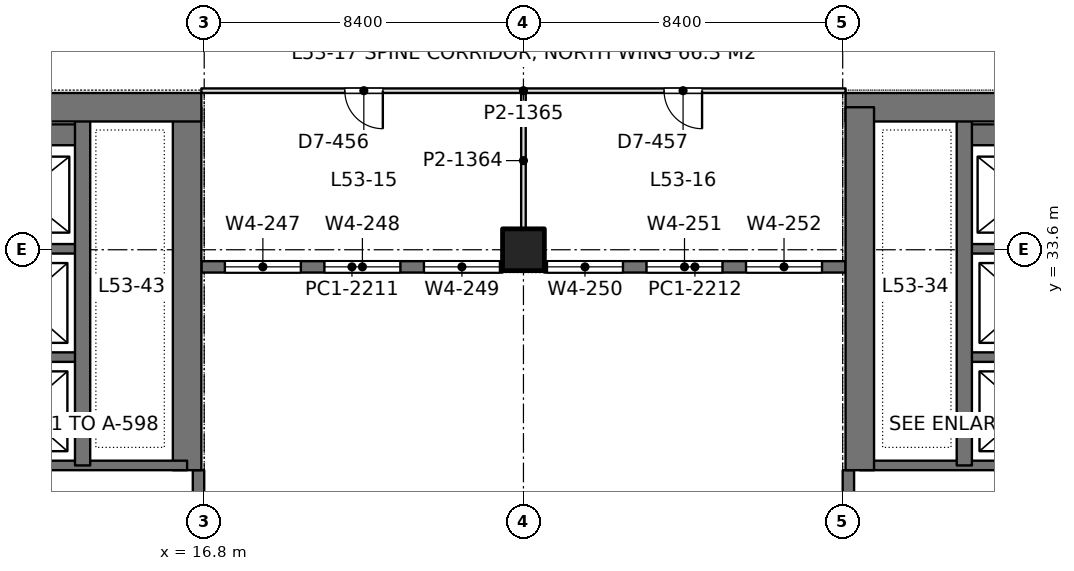
"""IFC4 building model, lengths in metres.
Left out: names, types, materials, properties, quantities, classifications, styles, units other than length and angle.
Written with IfcOpenShell. Run it as: python <this file> out.ifc"""

import sys

from ifc_helpers import new_model, si_unit, direction, frame, frame_2d, origin, origin_2d, place, context, subcontext, project, spatial, rectangle, extrude, element, fill, save


model = new_model("IFC4")
c1 = context("Model", 3, precision=1e-05, world=origin(), true_north=direction((0.0, 1.0)))
c2 = subcontext(c1, "Body", "Model", "MODEL_VIEW")
j1 = project(units=[si_unit("LENGTHUNIT", "METRE"), si_unit("PLANEANGLEUNIT", "RADIAN")], contexts=[c1])
p1 = place(None, origin())
s1 = spatial("IfcSite", under=j1, at=p1, CompositionType="ELEMENT")
p2 = place(p1, origin())
s2 = spatial("IfcBuilding", under=s1, at=p2, CompositionType="ELEMENT")
p3 = place(p2, frame((0.0, 0.0, 232.2)))
s3 = spatial("IfcBuildingStorey", under=s2, at=p3, CompositionType="ELEMENT", Elevation=232.2)
p4 = place(p3, frame((25.2, 33.6, 0.0), z_axis=(0.0, 0.0, 1.0), x_axis=(1.0, 0.0, 0.0)))
e1 = element("IfcColumn", 1, at=p4, inside=s3, PredefinedType="COLUMN", context=c2, shape_type="SweptSolid", body=[
    extrude(rectangle(XDim=1.1, YDim=1.1, at=origin_2d()), origin(), (0.0, 0.0, 1.0), 4.2),
])
p5 = place(p3, frame((-1.125, 37.35, 0.0), z_axis=(0.0, 0.0, 1.0), x_axis=(1.0, 0.0, 0.0)))
e2 = element("IfcWall", 2, at=p5, inside=s3, PredefinedType="SHEAR", context=c2, shape_type="SweptSolid", body=[
    extrude(rectangle(XDim=17.85, YDim=0.75, at=frame_2d((8.925, 0.0))), origin(), (0.0, 0.0, 1.0), 4.2),
])
p6 = place(p5, frame((8.875, 0.0, 0.0)))
e3 = element("IfcOpeningElement", 3, at=p6, cuts=e2, PredefinedType="OPENING", context=c2, shape_type="SweptSolid", body=[
    extrude(rectangle(XDim=1.8, YDim=2.4, at=frame_2d((0.9, 1.2))), frame((0.0, 0.385, 0.0), z_axis=(0.0, -1.0, 0.0), x_axis=(1.0, 0.0, 0.0)), (0.0, 0.0, 1.0), 0.77),
])
p7 = place(p3, frame((16.35, 27.8, 0.0), z_axis=(0.0, 0.0, 1.0), x_axis=(0.0, 1.0, 0.0)))
e4 = element("IfcWall", 4, at=p7, inside=s3, PredefinedType="SHEAR", context=c2, shape_type="SweptSolid", body=[
    extrude(rectangle(XDim=9.55, YDim=0.75, at=frame_2d((4.775, 0.0))), origin(), (0.0, 0.0, 1.0), 4.2),
])
p8 = place(p3, frame((13.6, 27.925, 0.0), z_axis=(0.0, 0.0, 1.0), x_axis=(0.0, 1.0, 0.0)))
e5 = element("IfcWall", 5, at=p8, inside=s3, PredefinedType="SHEAR", context=c2, shape_type="SweptSolid", body=[
    extrude(rectangle(XDim=9.425, YDim=0.4, at=frame_2d((4.712, 0.0))), origin(), (0.0, 0.0, 1.0), 4.2),
])
p9 = place(p3, frame((10.4, 27.925, 0.0), z_axis=(0.0, 0.0, 1.0), x_axis=(1.0, 0.0, 0.0)))
e6 = element("IfcWall", 6, at=p9, inside=s3, PredefinedType="SHEAR", context=c2, shape_type="SweptSolid", body=[
    extrude(rectangle(XDim=5.95, YDim=0.25, at=frame_2d((2.975, 0.0))), origin(), (0.0, 0.0, 1.0), 4.2),
])
for number, where, z_axis, x_axis in (
    (7, (10.4, 30.775, 0.0), (0.0, 0.0, 1.0), (1.0, 0.0, 0.0)),
    (8, (10.4, 33.625, 0.0), (0.0, 0.0, 1.0), (1.0, 0.0, 0.0)),
):
    element("IfcWall", number, at=place(p3, frame(where, z_axis=z_axis, x_axis=x_axis)), inside=s3, PredefinedType="SHEAR", context=c2, shape_type="SweptSolid", body=[
        extrude(rectangle(XDim=3.2, YDim=0.25, at=frame_2d((1.6, 0.0))), origin(), (0.0, 0.0, 1.0), 4.2),
    ])
p10 = place(p3, frame((10.4, 36.625, 0.0), z_axis=(0.0, 0.0, 1.0), x_axis=(1.0, 0.0, 0.0)))
e9 = element("IfcWall", 9, at=p10, inside=s3, PredefinedType="SHEAR", context=c2, shape_type="SweptSolid", body=[
    extrude(rectangle(XDim=3.2, YDim=0.55, at=frame_2d((1.6, 0.0))), origin(), (0.0, 0.0, 1.0), 4.2),
])
p11 = place(p3, frame((33.675, 37.35, 0.0), z_axis=(0.0, 0.0, 1.0), x_axis=(1.0, 0.0, 0.0)))
e10 = element("IfcWall", 10, at=p11, inside=s3, PredefinedType="SHEAR", context=c2, shape_type="SweptSolid", body=[
    extrude(rectangle(XDim=17.85, YDim=0.75, at=frame_2d((8.925, 0.0))), origin(), (0.0, 0.0, 1.0), 4.2),
])
p12 = place(p11, frame((7.175, 0.0, 0.0)))
e11 = element("IfcOpeningElement", 11, at=p12, cuts=e10, PredefinedType="OPENING", context=c2, shape_type="SweptSolid", body=[
    extrude(rectangle(XDim=1.8, YDim=2.4, at=frame_2d((0.9, 1.2))), frame((0.0, 0.385, 0.0), z_axis=(0.0, -1.0, 0.0), x_axis=(1.0, 0.0, 0.0)), (0.0, 0.0, 1.0), 0.77),
])
p13 = place(p3, frame((34.05, 27.8, 0.0), z_axis=(0.0, 0.0, 1.0), x_axis=(0.0, 1.0, 0.0)))
e12 = element("IfcWall", 12, at=p13, inside=s3, PredefinedType="SHEAR", context=c2, shape_type="SweptSolid", body=[
    extrude(rectangle(XDim=9.55, YDim=0.75, at=frame_2d((4.775, 0.0))), origin(), (0.0, 0.0, 1.0), 4.2),
])
p14 = place(p3, frame((36.8, 27.925, 0.0), z_axis=(0.0, 0.0, 1.0), x_axis=(0.0, 1.0, 0.0)))
e13 = element("IfcWall", 13, at=p14, inside=s3, PredefinedType="SHEAR", context=c2, shape_type="SweptSolid", body=[
    extrude(rectangle(XDim=9.425, YDim=0.4, at=frame_2d((4.712, 0.0))), origin(), (0.0, 0.0, 1.0), 4.2),
])
p15 = place(p3, frame((40.0, 27.925, 0.0), z_axis=(0.0, 0.0, 1.0), x_axis=(-1.0, 0.0, 0.0)))
e14 = element("IfcWall", 14, at=p15, inside=s3, PredefinedType="SHEAR", context=c2, shape_type="SweptSolid", body=[
    extrude(rectangle(XDim=5.95, YDim=0.25, at=frame_2d((2.975, 0.0))), origin(), (0.0, 0.0, 1.0), 4.2),
])
for number, where, z_axis, x_axis in (
    (15, (40.0, 30.775, 0.0), (0.0, 0.0, 1.0), (-1.0, 0.0, 0.0)),
    (16, (40.0, 33.625, 0.0), (0.0, 0.0, 1.0), (-1.0, 0.0, 0.0)),
):
    element("IfcWall", number, at=place(p3, frame(where, z_axis=z_axis, x_axis=x_axis)), inside=s3, PredefinedType="SHEAR", context=c2, shape_type="SweptSolid", body=[
        extrude(rectangle(XDim=3.2, YDim=0.25, at=frame_2d((1.6, 0.0))), origin(), (0.0, 0.0, 1.0), 4.2),
    ])
p16 = place(p3, frame((40.0, 36.625, 0.0), z_axis=(0.0, 0.0, 1.0), x_axis=(-1.0, 0.0, 0.0)))
e17 = element("IfcWall", 17, at=p16, inside=s3, PredefinedType="SHEAR", context=c2, shape_type="SweptSolid", body=[
    extrude(rectangle(XDim=3.2, YDim=0.55, at=frame_2d((1.6, 0.0))), origin(), (0.0, 0.0, 1.0), 4.2),
])
p17 = place(p3, frame((16.65, 17.1, 0.0), z_axis=(0.0, 0.0, 1.0), x_axis=(0.0, 1.0, 0.0)))
e18 = element("IfcWall", 18, at=p17, inside=s3, PredefinedType="SOLIDWALL", context=c2, shape_type="SweptSolid", body=[
    extrude(rectangle(XDim=10.7, YDim=0.3, at=frame_2d((5.35, 0.0))), origin(), (0.0, 0.0, 1.0), 4.05),
])
p18 = place(p17, frame((0.55, 0.0, 0.9)))
e19 = element("IfcOpeningElement", 19, at=p18, cuts=e18, PredefinedType="OPENING", context=c2, shape_type="SweptSolid", body=[
    extrude(rectangle(XDim=2.0, YDim=1.9, at=frame_2d((1.0, 0.95))), frame((0.0, 0.16, 0.0), z_axis=(0.0, -1.0, 0.0), x_axis=(1.0, 0.0, 0.0)), (0.0, 0.0, 1.0), 0.32),
])
p19 = place(p17, frame((2.9, 0.0, 0.9)))
e20 = element("IfcOpeningElement", 20, at=p19, cuts=e18, PredefinedType="OPENING", context=c2, shape_type="SweptSolid", body=[
    extrude(rectangle(XDim=2.0, YDim=1.9, at=frame_2d((1.0, 0.95))), frame((0.0, 0.16, 0.0), z_axis=(0.0, -1.0, 0.0), x_axis=(1.0, 0.0, 0.0)), (0.0, 0.0, 1.0), 0.32),
])
p20 = place(p17, frame((7.675, 0.0, 0.9)))
e21 = element("IfcOpeningElement", 21, at=p20, cuts=e18, PredefinedType="OPENING", context=c2, shape_type="SweptSolid", body=[
    extrude(rectangle(XDim=2.0, YDim=1.9, at=frame_2d((1.0, 0.95))), frame((0.0, 0.16, 0.0), z_axis=(0.0, -1.0, 0.0), x_axis=(1.0, 0.0, 0.0)), (0.0, 0.0, 1.0), 0.32),
])
p21 = place(p3, frame((33.75, 17.1, 0.0), z_axis=(0.0, 0.0, 1.0), x_axis=(0.0, 1.0, 0.0)))
e22 = element("IfcWall", 22, at=p21, inside=s3, PredefinedType="SOLIDWALL", context=c2, shape_type="SweptSolid", body=[
    extrude(rectangle(XDim=10.7, YDim=0.3, at=frame_2d((5.35, 0.0))), origin(), (0.0, 0.0, 1.0), 4.05),
])
p22 = place(p21, frame((0.55, 0.0, 0.9)))
e23 = element("IfcOpeningElement", 23, at=p22, cuts=e22, PredefinedType="OPENING", context=c2, shape_type="SweptSolid", body=[
    extrude(rectangle(XDim=2.0, YDim=1.9, at=frame_2d((1.0, 0.95))), frame((0.0, 0.16, 0.0), z_axis=(0.0, -1.0, 0.0), x_axis=(1.0, 0.0, 0.0)), (0.0, 0.0, 1.0), 0.32),
])
p23 = place(p21, frame((2.9, 0.0, 0.9)))
e24 = element("IfcOpeningElement", 24, at=p23, cuts=e22, PredefinedType="OPENING", context=c2, shape_type="SweptSolid", body=[
    extrude(rectangle(XDim=2.0, YDim=1.9, at=frame_2d((1.0, 0.95))), frame((0.0, 0.16, 0.0), z_axis=(0.0, -1.0, 0.0), x_axis=(1.0, 0.0, 0.0)), (0.0, 0.0, 1.0), 0.32),
])
p24 = place(p21, frame((7.675, 0.0, 0.9)))
e25 = element("IfcOpeningElement", 25, at=p24, cuts=e22, PredefinedType="OPENING", context=c2, shape_type="SweptSolid", body=[
    extrude(rectangle(XDim=2.0, YDim=1.9, at=frame_2d((1.0, 0.95))), frame((0.0, 0.16, 0.0), z_axis=(0.0, -1.0, 0.0), x_axis=(1.0, 0.0, 0.0)), (0.0, 0.0, 1.0), 0.32),
])
p25 = place(p3, frame((16.725, 33.15, 0.0), z_axis=(0.0, 0.0, 1.0), x_axis=(1.0, 0.0, 0.0)))
e26 = element("IfcWall", 26, at=p25, inside=s3, PredefinedType="SOLIDWALL", context=c2, shape_type="SweptSolid", body=[
    extrude(rectangle(XDim=7.925, YDim=0.3, at=frame_2d((3.962, 0.0))), origin(), (0.0, 0.0, 1.0), 4.05),
])
p26 = place(p25, frame((0.619, 0.0, 0.9)))
e27 = element("IfcOpeningElement", 27, at=p26, cuts=e26, PredefinedType="OPENING", context=c2, shape_type="SweptSolid", body=[
    extrude(rectangle(XDim=2.0, YDim=1.9, at=frame_2d((1.0, 0.95))), frame((0.0, 0.16, 0.0), z_axis=(0.0, -1.0, 0.0), x_axis=(1.0, 0.0, 0.0)), (0.0, 0.0, 1.0), 0.32),
])
p27 = place(p25, frame((3.238, 0.0, 0.9)))
e28 = element("IfcOpeningElement", 28, at=p27, cuts=e26, PredefinedType="OPENING", context=c2, shape_type="SweptSolid", body=[
    extrude(rectangle(XDim=2.0, YDim=1.9, at=frame_2d((1.0, 0.95))), frame((0.0, 0.16, 0.0), z_axis=(0.0, -1.0, 0.0), x_axis=(1.0, 0.0, 0.0)), (0.0, 0.0, 1.0), 0.32),
])
p28 = place(p25, frame((5.856, 0.0, 0.9)))
e29 = element("IfcOpeningElement", 29, at=p28, cuts=e26, PredefinedType="OPENING", context=c2, shape_type="SweptSolid", body=[
    extrude(rectangle(XDim=2.0, YDim=1.9, at=frame_2d((1.0, 0.95))), frame((0.0, 0.16, 0.0), z_axis=(0.0, -1.0, 0.0), x_axis=(1.0, 0.0, 0.0)), (0.0, 0.0, 1.0), 0.32),
])
p29 = place(p3, frame((25.75, 33.15, 0.0), z_axis=(0.0, 0.0, 1.0), x_axis=(1.0, 0.0, 0.0)))
e30 = element("IfcWall", 30, at=p29, inside=s3, PredefinedType="SOLIDWALL", context=c2, shape_type="SweptSolid", body=[
    extrude(rectangle(XDim=7.925, YDim=0.3, at=frame_2d((3.962, 0.0))), origin(), (0.0, 0.0, 1.0), 4.05),
])
p30 = place(p29, frame((0.069, 0.0, 0.9)))
e31 = element("IfcOpeningElement", 31, at=p30, cuts=e30, PredefinedType="OPENING", context=c2, shape_type="SweptSolid", body=[
    extrude(rectangle(XDim=2.0, YDim=1.9, at=frame_2d((1.0, 0.95))), frame((0.0, 0.16, 0.0), z_axis=(0.0, -1.0, 0.0), x_axis=(1.0, 0.0, 0.0)), (0.0, 0.0, 1.0), 0.32),
])
p31 = place(p29, frame((2.688, 0.0, 0.9)))
e32 = element("IfcOpeningElement", 32, at=p31, cuts=e30, PredefinedType="OPENING", context=c2, shape_type="SweptSolid", body=[
    extrude(rectangle(XDim=2.0, YDim=1.9, at=frame_2d((1.0, 0.95))), frame((0.0, 0.16, 0.0), z_axis=(0.0, -1.0, 0.0), x_axis=(1.0, 0.0, 0.0)), (0.0, 0.0, 1.0), 0.32),
])
p32 = place(p29, frame((5.306, 0.0, 0.9)))
e33 = element("IfcOpeningElement", 33, at=p32, cuts=e30, PredefinedType="OPENING", context=c2, shape_type="SweptSolid", body=[
    extrude(rectangle(XDim=2.0, YDim=1.9, at=frame_2d((1.0, 0.95))), frame((0.0, 0.16, 0.0), z_axis=(0.0, -1.0, 0.0), x_axis=(1.0, 0.0, 0.0)), (0.0, 0.0, 1.0), 0.32),
])
p33 = place(p3, frame((25.2, 34.149, 0.0), z_axis=(0.0, 0.0, 1.0), x_axis=(0.0, 1.0, 0.0)))
e34 = element("IfcWall", 34, at=p33, inside=s3, PredefinedType="PARTITIONING", context=c2, shape_type="SweptSolid", body=[
    extrude(rectangle(XDim=3.593, YDim=0.12, at=frame_2d((1.796, 0.0))), origin(), (0.0, 0.0, 1.0), 3.55),
])
p34 = place(p3, frame((16.725, 37.785, 0.0), z_axis=(0.0, 0.0, 1.0), x_axis=(1.0, 0.0, 0.0)))
e35 = element("IfcWall", 35, at=p34, inside=s3, PredefinedType="PARTITIONING", context=c2, shape_type="SweptSolid", body=[
    extrude(rectangle(XDim=16.95, YDim=0.12, at=frame_2d((8.475, 0.0))), origin(), (0.0, 0.0, 1.0), 3.55),
])
p35 = place(p34, frame((3.775, 0.0, 0.0)))
e36 = element("IfcOpeningElement", 36, at=p35, cuts=e35, PredefinedType="OPENING", context=c2, shape_type="SweptSolid", body=[
    extrude(rectangle(XDim=1.0, YDim=2.4, at=frame_2d((0.5, 1.2))), frame((0.0, 0.07, 0.0), z_axis=(0.0, -1.0, 0.0), x_axis=(1.0, 0.0, 0.0)), (0.0, 0.0, 1.0), 0.14),
])
p36 = place(p34, frame((12.175, 0.0, 0.0)))
e37 = element("IfcOpeningElement", 37, at=p36, cuts=e35, PredefinedType="OPENING", context=c2, shape_type="SweptSolid", body=[
    extrude(rectangle(XDim=1.0, YDim=2.4, at=frame_2d((0.5, 1.2))), frame((0.0, 0.07, 0.0), z_axis=(0.0, -1.0, 0.0), x_axis=(1.0, 0.0, 0.0)), (0.0, 0.0, 1.0), 0.14),
])
p37 = place(p26, origin())
e38 = element("IfcWindow", 38, at=p37, inside=s3, PartitioningType="SINGLE_PANEL", PredefinedType="WINDOW", context=c2, shape_type="SweptSolid", body=[
    extrude(rectangle(XDim=2.0, YDim=1.9, at=frame_2d((1.0, 0.95))), frame((0.0, 0.03, 0.0), z_axis=(0.0, -1.0, 0.0), x_axis=(1.0, 0.0, 0.0)), (0.0, 0.0, 1.0), 0.06),
])
fill(e27, e38)
p38 = place(p27, origin())
e39 = element("IfcWindow", 39, at=p38, inside=s3, PartitioningType="SINGLE_PANEL", PredefinedType="WINDOW", context=c2, shape_type="SweptSolid", body=[
    extrude(rectangle(XDim=2.0, YDim=1.9, at=frame_2d((1.0, 0.95))), frame((0.0, 0.03, 0.0), z_axis=(0.0, -1.0, 0.0), x_axis=(1.0, 0.0, 0.0)), (0.0, 0.0, 1.0), 0.06),
])
fill(e28, e39)
p39 = place(p28, origin())
e40 = element("IfcWindow", 40, at=p39, inside=s3, PartitioningType="SINGLE_PANEL", PredefinedType="WINDOW", context=c2, shape_type="SweptSolid", body=[
    extrude(rectangle(XDim=2.0, YDim=1.9, at=frame_2d((1.0, 0.95))), frame((0.0, 0.03, 0.0), z_axis=(0.0, -1.0, 0.0), x_axis=(1.0, 0.0, 0.0)), (0.0, 0.0, 1.0), 0.06),
])
fill(e29, e40)
p40 = place(p30, origin())
e41 = element("IfcWindow", 41, at=p40, inside=s3, PartitioningType="SINGLE_PANEL", PredefinedType="WINDOW", context=c2, shape_type="SweptSolid", body=[
    extrude(rectangle(XDim=2.0, YDim=1.9, at=frame_2d((1.0, 0.95))), frame((0.0, 0.03, 0.0), z_axis=(0.0, -1.0, 0.0), x_axis=(1.0, 0.0, 0.0)), (0.0, 0.0, 1.0), 0.06),
])
fill(e31, e41)
p41 = place(p31, origin())
e42 = element("IfcWindow", 42, at=p41, inside=s3, PartitioningType="SINGLE_PANEL", PredefinedType="WINDOW", context=c2, shape_type="SweptSolid", body=[
    extrude(rectangle(XDim=2.0, YDim=1.9, at=frame_2d((1.0, 0.95))), frame((0.0, 0.03, 0.0), z_axis=(0.0, -1.0, 0.0), x_axis=(1.0, 0.0, 0.0)), (0.0, 0.0, 1.0), 0.06),
])
fill(e32, e42)
p42 = place(p32, origin())
e43 = element("IfcWindow", 43, at=p42, inside=s3, PartitioningType="SINGLE_PANEL", PredefinedType="WINDOW", context=c2, shape_type="SweptSolid", body=[
    extrude(rectangle(XDim=2.0, YDim=1.9, at=frame_2d((1.0, 0.95))), frame((0.0, 0.03, 0.0), z_axis=(0.0, -1.0, 0.0), x_axis=(1.0, 0.0, 0.0)), (0.0, 0.0, 1.0), 0.06),
])
fill(e33, e43)
p43 = place(p35, frame((1.0, 0.0, 0.0), z_axis=(0.0, 0.0, 1.0), x_axis=(-1.0, 0.0, 0.0)))
e44 = element("IfcDoor", 44, at=p43, inside=s3, OperationType="SINGLE_SWING_LEFT", PredefinedType="DOOR", context=c2, shape_type="SweptSolid", body=[
    extrude(rectangle(XDim=1.0, YDim=2.4, at=frame_2d((0.5, 1.2))), frame((0.0, 0.025, 0.0), z_axis=(0.0, -1.0, 0.0), x_axis=(1.0, 0.0, 0.0)), (0.0, 0.0, 1.0), 0.05),
])
fill(e36, e44)
p44 = place(p36, frame((1.0, 0.0, 0.0), z_axis=(0.0, 0.0, 1.0), x_axis=(-1.0, 0.0, 0.0)))
e45 = element("IfcDoor", 45, at=p44, inside=s3, OperationType="SINGLE_SWING_LEFT", PredefinedType="DOOR", context=c2, shape_type="SweptSolid", body=[
    extrude(rectangle(XDim=1.0, YDim=2.4, at=frame_2d((0.5, 1.2))), frame((0.0, 0.025, 0.0), z_axis=(0.0, -1.0, 0.0), x_axis=(1.0, 0.0, 0.0)), (0.0, 0.0, 1.0), 0.05),
])
fill(e37, e45)
save(model, sys.argv[1])
